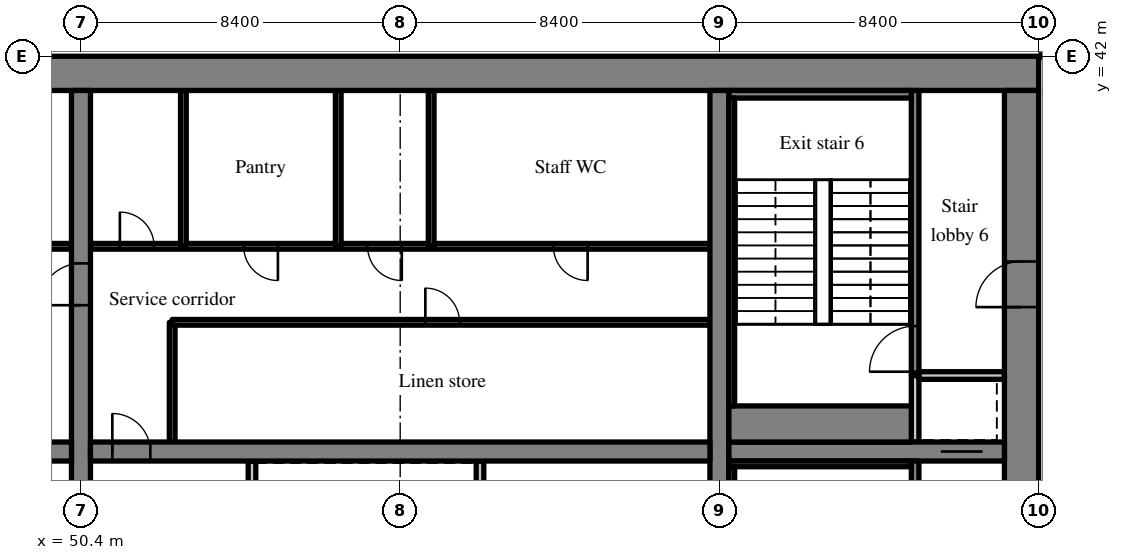
"""IFC4 building model, lengths in metres.
Left out: names, types, materials, properties, quantities, classifications, styles, units other than length and angle.
Written with IfcOpenShell. Run it as: python <this file> out.ifc"""

import sys

from ifc_helpers import new_model, si_unit, direction, frame, frame_2d, origin, place, context, subcontext, project, spatial, rectangle, extrude, source, transform, mapped, element, fill, save


model = new_model("IFC4")
c1 = context("Model", 3, precision=1e-05, world=origin(), true_north=direction((0.0, 1.0)))
c2 = subcontext(c1, "Body", "Model", "MODEL_VIEW")
j1 = project(units=[si_unit("LENGTHUNIT", "METRE"), si_unit("PLANEANGLEUNIT", "RADIAN")], contexts=[c1])
p1 = place(None, origin())
s1 = spatial("IfcSite", under=j1, at=p1, CompositionType="ELEMENT")
p2 = place(p1, origin())
s2 = spatial("IfcBuilding", under=s1, at=p2, CompositionType="ELEMENT")
p3 = place(p2, frame((0.0, 0.0, 106.6)))
s3 = spatial("IfcBuildingStorey", under=s2, at=p3, CompositionType="ELEMENT", Elevation=106.6)
m1 = source(origin(), c2, "Body", "SweptSolid", [
    extrude(rectangle(XDim=50.4, YDim=0.9, at=frame_2d((25.2, 0.0))), origin(), (0.0, 0.0, 1.0), 3.52),
])
p4 = place(p3, frame((25.2, 41.55, 0.0), z_axis=(0.0, 0.0, 1.0), x_axis=(1.0, 0.0, 0.0)))
e1 = element("IfcWall", 1, at=p4, inside=s3, PredefinedType="SHEAR", context=c2, shape_type="MappedRepresentation", body=[
    mapped(m1, transform((0.0, 0.0, 0.0), scale=1.0)),
])
m2 = source(origin(), c2, "Body", "SweptSolid", [
    extrude(rectangle(XDim=18.2, YDim=0.9, at=frame_2d((9.1, 0.0))), origin(), (0.0, 0.0, 1.0), 3.52),
])
p5 = place(p3, frame((75.15, 22.9, 0.0), z_axis=(0.0, 0.0, 1.0), x_axis=(0.0, 1.0, 0.0)))
e2 = element("IfcWall", 2, at=p5, inside=s3, PredefinedType="SHEAR", context=c2, shape_type="MappedRepresentation", body=[
    mapped(m2, transform((0.0, 0.0, 0.0), scale=1.0)),
])
m3 = source(origin(), c2, "Body", "SweptSolid", [
    extrude(rectangle(XDim=1.0, YDim=2.1, at=frame_2d((0.5, 1.05))), frame((0.0, 0.46, 0.0), z_axis=(0.0, -1.0, 0.0), x_axis=(1.0, 0.0, 0.0)), (0.0, 0.0, 1.0), 0.92),
])
p6 = place(p5, frame((2.6, 0.0, 0.0)))
e3 = element("IfcOpeningElement", 3, at=p6, cuts=e2, PredefinedType="OPENING", context=c2, shape_type="MappedRepresentation", body=[
    mapped(m3, transform((0.0, 0.0, 0.0), scale=1.0)),
])
m4 = source(origin(), c2, "Body", "SweptSolid", [
    extrude(rectangle(XDim=1.2, YDim=2.1, at=frame_2d((0.6, 1.05))), frame((0.0, 0.46, 0.0), z_axis=(0.0, -1.0, 0.0), x_axis=(1.0, 0.0, 0.0)), (0.0, 0.0, 1.0), 0.92),
])
p7 = place(p5, frame((12.5, 0.0, 0.0)))
e4 = element("IfcOpeningElement", 4, at=p7, cuts=e2, PredefinedType="OPENING", context=c2, shape_type="MappedRepresentation", body=[
    mapped(m4, transform((0.0, 0.0, 0.0), scale=1.0)),
])
m5 = source(origin(), c2, "Body", "SweptSolid", [
    extrude(rectangle(XDim=18.2, YDim=0.5, at=frame_2d((9.1, 0.0))), origin(), (0.0, 0.0, 1.0), 3.52),
])
p8 = place(p3, frame((50.4, 22.9, 0.0), z_axis=(0.0, 0.0, 1.0), x_axis=(0.0, 1.0, 0.0)))
e5 = element("IfcWall", 5, at=p8, inside=s3, PredefinedType="SHEAR", context=c2, shape_type="MappedRepresentation", body=[
    mapped(m5, transform((0.0, 0.0, 0.0), scale=1.0)),
])
m6 = source(origin(), c2, "Body", "SweptSolid", [
    extrude(rectangle(XDim=1.1, YDim=2.1, at=frame_2d((0.55, 1.05))), frame((0.0, 0.26, 0.0), z_axis=(0.0, -1.0, 0.0), x_axis=(1.0, 0.0, 0.0)), (0.0, 0.0, 1.0), 0.52),
])
p9 = place(p8, frame((12.55, 0.0, 0.0)))
e6 = element("IfcOpeningElement", 6, at=p9, cuts=e5, PredefinedType="OPENING", context=c2, shape_type="MappedRepresentation", body=[
    mapped(m6, transform((0.0, 0.0, 0.0), scale=1.0)),
])
p10 = place(p3, frame((67.2, 22.9, 0.0), z_axis=(0.0, 0.0, 1.0), x_axis=(0.0, 1.0, 0.0)))
e7 = element("IfcWall", 7, at=p10, inside=s3, PredefinedType="SHEAR", context=c2, shape_type="MappedRepresentation", body=[
    mapped(m5, transform((0.0, 0.0, 0.0), scale=1.0)),
])
m7 = source(origin(), c2, "Body", "SweptSolid", [
    extrude(rectangle(XDim=16.3, YDim=0.5, at=frame_2d((8.15, 0.0))), origin(), (0.0, 0.0, 1.0), 3.52),
])
p11 = place(p3, frame((33.85, 31.6, 0.0), z_axis=(0.0, 0.0, 1.0), x_axis=(1.0, 0.0, 0.0)))
e8 = element("IfcWall", 8, at=p11, inside=s3, PredefinedType="SHEAR", context=c2, shape_type="MappedRepresentation", body=[
    mapped(m7, transform((0.0, 0.0, 0.0), scale=1.0)),
])
m8 = source(origin(), c2, "Body", "SweptSolid", [
    extrude(rectangle(XDim=1.0, YDim=2.1, at=frame_2d((0.5, 1.05))), frame((0.0, 0.26, 0.0), z_axis=(0.0, -1.0, 0.0), x_axis=(1.0, 0.0, 0.0)), (0.0, 0.0, 1.0), 0.52),
])
p12 = place(p11, frame((14.725, 0.0, 0.0)))
e9 = element("IfcOpeningElement", 9, at=p12, cuts=e8, PredefinedType="OPENING", context=c2, shape_type="MappedRepresentation", body=[
    mapped(m8, transform((0.0, 0.0, 0.0), scale=1.0)),
])
m9 = source(origin(), c2, "Body", "SweptSolid", [
    extrude(rectangle(XDim=16.3, YDim=0.5, at=frame_2d((8.15, 0.0))), origin(), (0.0, 0.0, 1.0), 3.52),
])
p13 = place(p3, frame((50.65, 31.6, 0.0), z_axis=(0.0, 0.0, 1.0), x_axis=(1.0, 0.0, 0.0)))
e10 = element("IfcWall", 10, at=p13, inside=s3, PredefinedType="SHEAR", context=c2, shape_type="MappedRepresentation", body=[
    mapped(m9, transform((0.0, 0.0, 0.0), scale=1.0)),
])
p14 = place(p13, frame((0.575, 0.0, 0.0)))
e11 = element("IfcOpeningElement", 11, at=p14, cuts=e10, PredefinedType="OPENING", context=c2, shape_type="MappedRepresentation", body=[
    mapped(m8, transform((0.0, 0.0, 0.0), scale=1.0)),
])
m10 = source(origin(), c2, "Body", "SweptSolid", [
    extrude(rectangle(XDim=7.25, YDim=0.5, at=frame_2d((3.625, 0.0))), origin(), (0.0, 0.0, 1.0), 3.52),
])
p15 = place(p3, frame((67.45, 31.6, 0.0), z_axis=(0.0, 0.0, 1.0), x_axis=(1.0, 0.0, 0.0)))
e12 = element("IfcWall", 12, at=p15, inside=s3, PredefinedType="SHEAR", context=c2, shape_type="MappedRepresentation", body=[
    mapped(m10, transform((0.0, 0.0, 0.0), scale=1.0)),
])
p16 = place(p15, frame((5.575, 0.0, 0.0)))
e13 = element("IfcOpeningElement", 13, at=p16, cuts=e12, PredefinedType="OPENING", context=c2, shape_type="MappedRepresentation", body=[
    mapped(m6, transform((0.0, 0.0, 0.0), scale=1.0)),
])
m11 = source(origin(), c2, "Body", "SweptSolid", [
    extrude(rectangle(XDim=16.3, YDim=0.15, at=frame_2d((8.15, 0.0))), origin(), (0.0, 0.0, 1.0), 3.52),
])
p17 = place(p3, frame((33.85, 37.0, 0.0), z_axis=(0.0, 0.0, 1.0), x_axis=(1.0, 0.0, 0.0)))
e14 = element("IfcWall", 14, at=p17, inside=s3, PredefinedType="PARTITIONING", context=c2, shape_type="MappedRepresentation", body=[
    mapped(m11, transform((0.0, 0.0, 0.0), scale=1.0)),
])
m12 = source(origin(), c2, "Body", "SweptSolid", [
    extrude(rectangle(XDim=0.9, YDim=2.1, at=frame_2d((0.45, 1.05))), frame((0.0, 0.085, 0.0), z_axis=(0.0, -1.0, 0.0), x_axis=(1.0, 0.0, 0.0)), (0.0, 0.0, 1.0), 0.17),
])
p18 = place(p17, frame((1.588, 0.0, 0.0)))
e15 = element("IfcOpeningElement", 15, at=p18, cuts=e14, PredefinedType="OPENING", context=c2, shape_type="MappedRepresentation", body=[
    mapped(m12, transform((0.0, 0.0, 0.0), scale=1.0)),
])
p19 = place(p17, frame((7.293, 0.0, 0.0)))
e16 = element("IfcOpeningElement", 16, at=p19, cuts=e14, PredefinedType="OPENING", context=c2, shape_type="MappedRepresentation", body=[
    mapped(m12, transform((0.0, 0.0, 0.0), scale=1.0)),
])
p20 = place(p17, frame((12.183, 0.0, 0.0)))
e17 = element("IfcOpeningElement", 17, at=p20, cuts=e14, PredefinedType="OPENING", context=c2, shape_type="MappedRepresentation", body=[
    mapped(m12, transform((0.0, 0.0, 0.0), scale=1.0)),
])
p21 = place(p17, frame((14.627, 0.0, 0.0)))
e18 = element("IfcOpeningElement", 18, at=p21, cuts=e14, PredefinedType="OPENING", context=c2, shape_type="MappedRepresentation", body=[
    mapped(m12, transform((0.0, 0.0, 0.0), scale=1.0)),
])
m13 = source(origin(), c2, "Body", "SweptSolid", [
    extrude(rectangle(XDim=8.45, YDim=0.2, at=frame_2d((4.225, 0.0))), origin(), (0.0, 0.0, 1.0), 3.52),
])
for number, where, z_axis, x_axis in (
    (19, (54.9, 22.9, 0.0), (0.0, 0.0, 1.0), (0.0, 1.0, 0.0)),
    (20, (60.9, 22.9, 0.0), (0.0, 0.0, 1.0), (0.0, 1.0, 0.0)),
):
    element("IfcWall", number, at=place(p3, frame(where, z_axis=z_axis, x_axis=x_axis)), inside=s3, PredefinedType="PARTITIONING", context=c2, shape_type="MappedRepresentation", body=[
        mapped(m13, transform((0.0, 0.0, 0.0), scale=1.0)),
    ])
m14 = source(origin(), c2, "Body", "SweptSolid", [
    extrude(rectangle(XDim=3.15, YDim=0.15, at=frame_2d((1.575, 0.0))), origin(), (0.0, 0.0, 1.0), 3.52),
])
p22 = place(p3, frame((52.8, 31.85, 0.0), z_axis=(0.0, 0.0, 1.0), x_axis=(0.0, 1.0, 0.0)))
e21 = element("IfcWall", 21, at=p22, inside=s3, PredefinedType="PARTITIONING", context=c2, shape_type="MappedRepresentation", body=[
    mapped(m14, transform((0.0, 0.0, 0.0), scale=1.0)),
])
m15 = source(origin(), c2, "Body", "SweptSolid", [
    extrude(rectangle(XDim=14.15, YDim=0.15, at=frame_2d((7.075, 0.0))), origin(), (0.0, 0.0, 1.0), 3.52),
])
p23 = place(p3, frame((66.95, 35.0, 0.0), z_axis=(0.0, 0.0, 1.0), x_axis=(-1.0, 0.0, 0.0)))
e22 = element("IfcWall", 22, at=p23, inside=s3, PredefinedType="PARTITIONING", context=c2, shape_type="MappedRepresentation", body=[
    mapped(m15, transform((0.0, 0.0, 0.0), scale=1.0)),
])
p24 = place(p23, frame((6.588, 0.0, 0.0)))
e23 = element("IfcOpeningElement", 23, at=p24, cuts=e22, PredefinedType="OPENING", context=c2, shape_type="MappedRepresentation", body=[
    mapped(m12, transform((0.0, 0.0, 0.0), scale=1.0)),
])
m16 = source(origin(), c2, "Body", "SweptSolid", [
    extrude(rectangle(XDim=16.3, YDim=0.15, at=frame_2d((8.15, 0.0))), origin(), (0.0, 0.0, 1.0), 3.52),
])
p25 = place(p3, frame((66.95, 37.0, 0.0), z_axis=(0.0, 0.0, 1.0), x_axis=(-1.0, 0.0, 0.0)))
e24 = element("IfcWall", 24, at=p25, inside=s3, PredefinedType="PARTITIONING", context=c2, shape_type="MappedRepresentation", body=[
    mapped(m16, transform((0.0, 0.0, 0.0), scale=1.0)),
])
p26 = place(p25, frame((3.218, 0.0, 0.0)))
e25 = element("IfcOpeningElement", 25, at=p26, cuts=e24, PredefinedType="OPENING", context=c2, shape_type="MappedRepresentation", body=[
    mapped(m12, transform((0.0, 0.0, 0.0), scale=1.0)),
])
p27 = place(p25, frame((8.108, 0.0, 0.0)))
e26 = element("IfcOpeningElement", 26, at=p27, cuts=e24, PredefinedType="OPENING", context=c2, shape_type="MappedRepresentation", body=[
    mapped(m12, transform((0.0, 0.0, 0.0), scale=1.0)),
])
p28 = place(p25, frame((11.368, 0.0, 0.0)))
e27 = element("IfcOpeningElement", 27, at=p28, cuts=e24, PredefinedType="OPENING", context=c2, shape_type="MappedRepresentation", body=[
    mapped(m12, transform((0.0, 0.0, 0.0), scale=1.0)),
])
p29 = place(p25, frame((14.627, 0.0, 0.0)))
e28 = element("IfcOpeningElement", 28, at=p29, cuts=e24, PredefinedType="OPENING", context=c2, shape_type="MappedRepresentation", body=[
    mapped(m12, transform((0.0, 0.0, 0.0), scale=1.0)),
])
m17 = source(origin(), c2, "Body", "SweptSolid", [
    extrude(rectangle(XDim=4.1, YDim=0.15, at=frame_2d((2.05, 0.0))), origin(), (0.0, 0.0, 1.0), 3.52),
])
for number, where, z_axis, x_axis in (
    (29, (59.615, 37.0, 0.0), (0.0, 0.0, 1.0), (0.0, 1.0, 0.0)),
    (30, (57.17, 37.0, 0.0), (0.0, 0.0, 1.0), (0.0, 1.0, 0.0)),
    (31, (53.095, 37.0, 0.0), (0.0, 0.0, 1.0), (0.0, 1.0, 0.0)),
):
    element("IfcWall", number, at=place(p3, frame(where, z_axis=z_axis, x_axis=x_axis)), inside=s3, PredefinedType="PARTITIONING", context=c2, shape_type="MappedRepresentation", body=[
        mapped(m17, transform((0.0, 0.0, 0.0), scale=1.0)),
    ])
m18 = source(origin(), c2, "Body", "SweptSolid", [
    extrude(rectangle(XDim=8.45, YDim=0.2, at=frame_2d((4.225, 0.0))), origin(), (0.0, 0.0, 1.0), 3.52),
])
p30 = place(p3, frame((72.35, 22.9, 0.0), z_axis=(0.0, 0.0, 1.0), x_axis=(0.0, 1.0, 0.0)))
e32 = element("IfcWall", 32, at=p30, inside=s3, PredefinedType="SOLIDWALL", context=c2, shape_type="MappedRepresentation", body=[
    mapped(m18, transform((0.0, 0.0, 0.0), scale=1.0)),
])
m19 = source(origin(), c2, "Body", "SweptSolid", [
    extrude(rectangle(XDim=1.2, YDim=2.1, at=frame_2d((0.6, 1.05))), frame((0.0, 0.11, 0.0), z_axis=(0.0, -1.0, 0.0), x_axis=(1.0, 0.0, 0.0)), (0.0, 0.0, 1.0), 0.22),
])
p31 = place(p30, frame((0.7, 0.0, 0.0)))
e33 = element("IfcOpeningElement", 33, at=p31, cuts=e32, PredefinedType="OPENING", context=c2, shape_type="MappedRepresentation", body=[
    mapped(m19, transform((0.0, 0.0, 0.0), scale=1.0)),
])
m20 = source(origin(), c2, "Body", "SweptSolid", [
    extrude(rectangle(XDim=1.75, YDim=0.2, at=frame_2d((0.875, 0.0))), origin(), (0.0, 0.0, 1.0), 3.52),
])
p32 = place(p3, frame((72.35, 31.85, 0.0), z_axis=(0.0, 0.0, 1.0), x_axis=(0.0, 1.0, 0.0)))
e34 = element("IfcWall", 34, at=p32, inside=s3, PredefinedType="SOLIDWALL", context=c2, shape_type="MappedRepresentation", body=[
    mapped(m20, transform((0.0, 0.0, 0.0), scale=1.0)),
])
m21 = source(origin(), c2, "Body", "SweptSolid", [
    extrude(rectangle(XDim=2.25, YDim=0.2, at=frame_2d((1.125, 0.0))), origin(), (0.0, 0.0, 1.0), 3.52),
])
p33 = place(p3, frame((72.45, 33.6, 0.0), z_axis=(0.0, 0.0, 1.0), x_axis=(1.0, 0.0, 0.0)))
e35 = element("IfcWall", 35, at=p33, inside=s3, PredefinedType="SOLIDWALL", context=c2, shape_type="MappedRepresentation", body=[
    mapped(m21, transform((0.0, 0.0, 0.0), scale=1.0)),
])
m22 = source(origin(), c2, "Body", "SweptSolid", [
    extrude(rectangle(XDim=7.5, YDim=0.2, at=frame_2d((3.75, 0.0))), origin(), (0.0, 0.0, 1.0), 3.52),
])
p34 = place(p3, frame((72.35, 33.6, 0.0), z_axis=(0.0, 0.0, 1.0), x_axis=(0.0, 1.0, 0.0)))
e36 = element("IfcWall", 36, at=p34, inside=s3, PredefinedType="SOLIDWALL", context=c2, shape_type="MappedRepresentation", body=[
    mapped(m22, transform((0.0, 0.0, 0.0), scale=1.0)),
])
p35 = place(p34, frame((0.1, 0.0, 0.0)))
e37 = element("IfcOpeningElement", 37, at=p35, cuts=e36, PredefinedType="OPENING", context=c2, shape_type="MappedRepresentation", body=[
    mapped(m19, transform((0.0, 0.0, 0.0), scale=1.0)),
])
m23 = source(origin(), c2, "Body", "SweptSolid", [
    extrude(rectangle(XDim=4.8, YDim=0.15, at=frame_2d((2.4, 0.0))), origin(), (0.0, 0.0, 1.0), 3.52),
])
p36 = place(p3, frame((67.45, 31.275, 0.0), z_axis=(0.0, 0.0, 1.0), x_axis=(1.0, 0.0, 0.0)))
e38 = element("IfcWall", 38, at=p36, inside=s3, PredefinedType="SOLIDWALL", context=c2, shape_type="MappedRepresentation", body=[
    mapped(m23, transform((0.0, 0.0, 0.0), scale=1.0)),
])
m24 = source(origin(), c2, "Body", "SweptSolid", [
    extrude(rectangle(XDim=8.1, YDim=0.15, at=frame_2d((4.05, 0.0))), origin(), (0.0, 0.0, 1.0), 3.52),
])
p37 = place(p3, frame((67.525, 23.1, 0.0), z_axis=(0.0, 0.0, 1.0), x_axis=(0.0, 1.0, 0.0)))
e39 = element("IfcWall", 39, at=p37, inside=s3, PredefinedType="SOLIDWALL", context=c2, shape_type="MappedRepresentation", body=[
    mapped(m24, transform((0.0, 0.0, 0.0), scale=1.0)),
])
m25 = source(origin(), c2, "Body", "SweptSolid", [
    extrude(rectangle(XDim=4.8, YDim=0.2, at=frame_2d((2.4, 0.0))), origin(), (0.0, 0.0, 1.0), 3.52),
])
p38 = place(p3, frame((67.45, 41.0, 0.0), z_axis=(0.0, 0.0, 1.0), x_axis=(1.0, 0.0, 0.0)))
e40 = element("IfcWall", 40, at=p38, inside=s3, PredefinedType="SOLIDWALL", context=c2, shape_type="MappedRepresentation", body=[
    mapped(m25, transform((0.0, 0.0, 0.0), scale=1.0)),
])
m26 = source(origin(), c2, "Body", "SweptSolid", [
    extrude(rectangle(XDim=4.8, YDim=0.95, at=frame_2d((2.4, 0.0))), origin(), (0.0, 0.0, 1.0), 3.52),
])
p39 = place(p3, frame((67.45, 32.325, 0.0), z_axis=(0.0, 0.0, 1.0), x_axis=(1.0, 0.0, 0.0)))
e41 = element("IfcWall", 41, at=p39, inside=s3, PredefinedType="SOLIDWALL", context=c2, shape_type="MappedRepresentation", body=[
    mapped(m26, transform((0.0, 0.0, 0.0), scale=1.0)),
])
p40 = place(p3, frame((67.525, 32.8, 0.0), z_axis=(0.0, 0.0, 1.0), x_axis=(0.0, 1.0, 0.0)))
e42 = element("IfcWall", 42, at=p40, inside=s3, PredefinedType="SOLIDWALL", context=c2, shape_type="MappedRepresentation", body=[
    mapped(m24, transform((0.0, 0.0, 0.0), scale=1.0)),
])
m27 = source(origin(), c2, "Body", "SweptSolid", [
    extrude(rectangle(XDim=1.0, YDim=2.1, at=frame_2d((0.5, 1.05))), frame((0.0, 0.025, 0.0), z_axis=(0.0, -1.0, 0.0), x_axis=(1.0, 0.0, 0.0)), (0.0, 0.0, 1.0), 0.05),
])
p41 = place(p14, origin())
e43 = element("IfcDoor", 43, at=p41, inside=s3, OperationType="SINGLE_SWING_LEFT", PredefinedType="DOOR", context=c2, shape_type="MappedRepresentation", body=[
    mapped(m27, transform((0.0, 0.0, 0.0), scale=1.0)),
])
fill(e11, e43)
m28 = source(origin(), c2, "Body", "SweptSolid", [
    extrude(rectangle(XDim=0.9, YDim=2.1, at=frame_2d((0.45, 1.05))), frame((0.0, 0.025, 0.0), z_axis=(0.0, -1.0, 0.0), x_axis=(1.0, 0.0, 0.0)), (0.0, 0.0, 1.0), 0.05),
])
p42 = place(p24, origin())
e44 = element("IfcDoor", 44, at=p42, inside=s3, OperationType="SINGLE_SWING_RIGHT", PredefinedType="DOOR", context=c2, shape_type="MappedRepresentation", body=[
    mapped(m28, transform((0.0, 0.0, 0.0), scale=1.0)),
])
fill(e23, e44)
p43 = place(p26, origin())
e45 = element("IfcDoor", 45, at=p43, inside=s3, OperationType="SINGLE_SWING_LEFT", PredefinedType="DOOR", context=c2, shape_type="MappedRepresentation", body=[
    mapped(m28, transform((0.0, 0.0, 0.0), scale=1.0)),
])
fill(e25, e45)
p44 = place(p27, origin())
e46 = element("IfcDoor", 46, at=p44, inside=s3, OperationType="SINGLE_SWING_LEFT", PredefinedType="DOOR", context=c2, shape_type="MappedRepresentation", body=[
    mapped(m28, transform((0.0, 0.0, 0.0), scale=1.0)),
])
fill(e26, e46)
p45 = place(p28, origin())
e47 = element("IfcDoor", 47, at=p45, inside=s3, OperationType="SINGLE_SWING_LEFT", PredefinedType="DOOR", context=c2, shape_type="MappedRepresentation", body=[
    mapped(m28, transform((0.0, 0.0, 0.0), scale=1.0)),
])
fill(e27, e47)
p46 = place(p29, origin())
e48 = element("IfcDoor", 48, at=p46, inside=s3, OperationType="SINGLE_SWING_RIGHT", PredefinedType="DOOR", context=c2, shape_type="MappedRepresentation", body=[
    mapped(m28, transform((0.0, 0.0, 0.0), scale=1.0)),
])
fill(e28, e48)
m29 = source(origin(), c2, "Body", "SweptSolid", [
    extrude(rectangle(XDim=1.1, YDim=2.1, at=frame_2d((0.55, 1.05))), frame((0.0, 0.025, 0.0), z_axis=(0.0, -1.0, 0.0), x_axis=(1.0, 0.0, 0.0)), (0.0, 0.0, 1.0), 0.05),
])
p47 = place(p16, origin())
e49 = element("IfcDoor", 49, at=p47, inside=s3, OperationType="SLIDING_TO_RIGHT", PredefinedType="DOOR", context=c2, shape_type="MappedRepresentation", body=[
    mapped(m29, transform((0.0, 0.0, 0.0), scale=1.0)),
])
fill(e13, e49)
m30 = source(origin(), c2, "Body", "SweptSolid", [
    extrude(rectangle(XDim=1.2, YDim=2.1, at=frame_2d((0.6, 1.05))), frame((0.0, 0.025, 0.0), z_axis=(0.0, -1.0, 0.0), x_axis=(1.0, 0.0, 0.0)), (0.0, 0.0, 1.0), 0.05),
])
p48 = place(p35, origin())
e50 = element("IfcDoor", 50, at=p48, inside=s3, OperationType="SINGLE_SWING_LEFT", PredefinedType="DOOR", context=c2, shape_type="MappedRepresentation", body=[
    mapped(m30, transform((0.0, 0.0, 0.0), scale=1.0)),
])
fill(e37, e50)
p49 = place(p7, origin())
e51 = element("IfcDoor", 51, at=p49, inside=s3, OperationType="SINGLE_SWING_LEFT", PredefinedType="DOOR", context=c2, shape_type="MappedRepresentation", body=[
    mapped(m30, transform((0.0, 0.0, 0.0), scale=1.0)),
])
fill(e4, e51)
p50 = place(p9, origin())
e52 = element("IfcDoor", 52, at=p50, inside=s3, OperationType="SINGLE_SWING_LEFT", PredefinedType="DOOR", context=c2, shape_type="MappedRepresentation", body=[
    mapped(m29, transform((0.0, 0.0, 0.0), scale=1.0)),
])
fill(e6, e52)
save(model, sys.argv[1])
